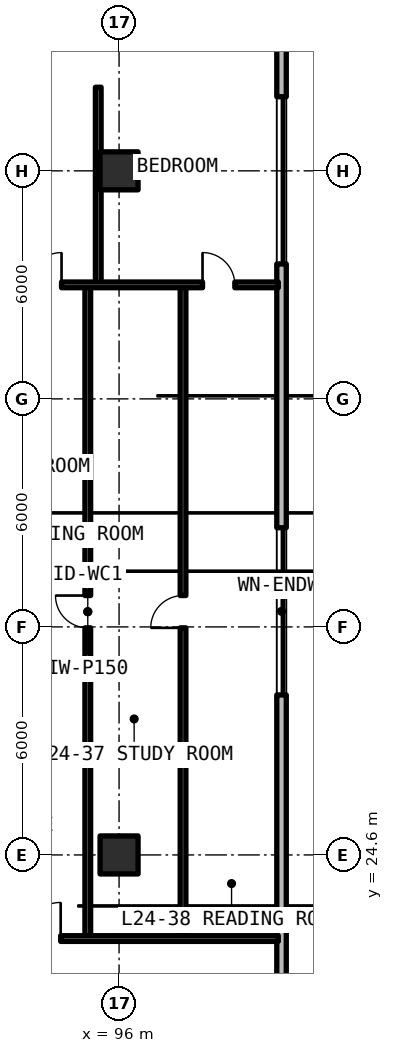
"""IFC4 building model, lengths in metres.
Left out: names, types, materials, properties, quantities, classifications, styles, units other than length and angle.
Written with IfcOpenShell. Run it as: python <this file> out.ifc"""

import sys

from ifc_helpers import new_model, si_unit, direction, frame, frame_2d, origin, origin_2d, place, context, subcontext, project, spatial, rectangle, extrude, element, fill, save


model = new_model("IFC4")
c1 = context("Model", 3, precision=1e-05, world=origin(), true_north=direction((0.0, 1.0)))
c2 = subcontext(c1, "Body", "Model", "MODEL_VIEW")
j1 = project(units=[si_unit("LENGTHUNIT", "METRE"), si_unit("PLANEANGLEUNIT", "RADIAN")], contexts=[c1])
p1 = place(None, origin())
s1 = spatial("IfcSite", under=j1, at=p1, CompositionType="ELEMENT")
p2 = place(p1, origin())
s2 = spatial("IfcBuilding", under=s1, at=p2, CompositionType="ELEMENT")
p3 = place(p2, frame((0.0, 0.0, 88.77)))
s3 = spatial("IfcBuildingStorey", under=s2, at=p3, CompositionType="ELEMENT", Elevation=88.77)
for number, where, z_axis, x_axis in (
    (1, (96.0, 24.6, 0.0), (0.0, 0.0, 1.0), (1.0, 0.0, 0.0)),
    (2, (96.0, 42.6, 0.0), (0.0, 0.0, 1.0), (1.0, 0.0, 0.0)),
):
    element("IfcColumn", number, at=place(p3, frame(where, z_axis=z_axis, x_axis=x_axis)), inside=s3, PredefinedType="COLUMN", context=c2, shape_type="SweptSolid", body=[
        extrude(rectangle(XDim=1.0, YDim=1.0, at=origin_2d()), origin(), (0.0, 0.0, 1.0), 3.3),
    ])
p4 = place(p3, frame((100.275, 13.852, 0.0), z_axis=(0.0, 0.0, 1.0), x_axis=(0.0, 1.0, 0.0)))
e3 = element("IfcWall", 3, at=p4, inside=s3, PredefinedType="SOLIDWALL", context=c2, shape_type="SweptSolid", body=[
    extrude(rectangle(XDim=39.496, YDim=0.25, at=frame_2d((19.748, 0.0))), origin(), (0.0, 0.0, 1.0), 3.08),
])
p5 = place(p4, frame((36.448, 0.0, 0.0)))
e4 = element("IfcOpeningElement", 4, at=p5, cuts=e3, PredefinedType="OPENING", context=c2, shape_type="SweptSolid", body=[
    extrude(rectangle(XDim=1.1, YDim=2.15, at=frame_2d((0.55, 1.075))), frame((0.0, 0.135, 0.0), z_axis=(0.0, -1.0, 0.0), x_axis=(1.0, 0.0, 0.0)), (0.0, 0.0, 1.0), 0.27),
])
p6 = place(p4, frame((14.958, 0.0, 0.78)))
e5 = element("IfcOpeningElement", 5, at=p6, cuts=e3, PredefinedType="OPENING", context=c2, shape_type="SweptSolid", body=[
    extrude(rectangle(XDim=4.4, YDim=1.66, at=frame_2d((2.2, 0.83))), frame((0.0, 0.135, 0.0), z_axis=(0.0, -1.0, 0.0), x_axis=(1.0, 0.0, 0.0)), (0.0, 0.0, 1.0), 0.27),
])
p7 = place(p4, frame((26.298, 0.0, 0.78)))
e6 = element("IfcOpeningElement", 6, at=p7, cuts=e3, PredefinedType="OPENING", context=c2, shape_type="SweptSolid", body=[
    extrude(rectangle(XDim=4.4, YDim=1.66, at=frame_2d((2.2, 0.83))), frame((0.0, 0.135, 0.0), z_axis=(0.0, -1.0, 0.0), x_axis=(1.0, 0.0, 0.0)), (0.0, 0.0, 1.0), 0.27),
])
p8 = place(p4, frame((2.454, 0.0, 0.78)))
e7 = element("IfcOpeningElement", 7, at=p8, cuts=e3, PredefinedType="OPENING", context=c2, shape_type="SweptSolid", body=[
    extrude(rectangle(XDim=1.4, YDim=1.65, at=frame_2d((0.7, 0.825))), frame((0.0, 0.135, 0.0), z_axis=(0.0, -1.0, 0.0), x_axis=(1.0, 0.0, 0.0)), (0.0, 0.0, 1.0), 0.27),
])
p9 = place(p3, frame((95.177, 22.4, 0.0), z_axis=(0.0, 0.0, 1.0), x_axis=(0.0, 1.0, 0.0)))
e8 = element("IfcWall", 8, at=p9, inside=s3, PredefinedType="PARTITIONING", context=c2, shape_type="SweptSolid", body=[
    extrude(rectangle(XDim=17.2, YDim=0.15, at=frame_2d((8.6, 0.0))), origin(), (0.0, 0.0, 1.0), 2.35),
])
p10 = place(p9, frame((8.175, 0.0, 0.0)))
e9 = element("IfcOpeningElement", 9, at=p10, cuts=e8, PredefinedType="OPENING", context=c2, shape_type="SweptSolid", body=[
    extrude(rectangle(XDim=0.85, YDim=2.1, at=frame_2d((0.425, 1.05))), frame((0.0, 0.085, 0.0), z_axis=(0.0, -1.0, 0.0), x_axis=(1.0, 0.0, 0.0)), (0.0, 0.0, 1.0), 0.17),
])
p11 = place(p3, frame((97.683, 22.4, 0.0), z_axis=(0.0, 0.0, 1.0), x_axis=(0.0, 1.0, 0.0)))
e10 = element("IfcWall", 10, at=p11, inside=s3, PredefinedType="PARTITIONING", context=c2, shape_type="SweptSolid", body=[
    extrude(rectangle(XDim=17.2, YDim=0.15, at=frame_2d((8.6, 0.0))), origin(), (0.0, 0.0, 1.0), 2.35),
])
p12 = place(p11, frame((8.175, 0.0, 0.0)))
e11 = element("IfcOpeningElement", 11, at=p12, cuts=e10, PredefinedType="OPENING", context=c2, shape_type="SweptSolid", body=[
    extrude(rectangle(XDim=0.85, YDim=2.1, at=frame_2d((0.425, 1.05))), frame((0.0, 0.085, 0.0), z_axis=(0.0, -1.0, 0.0), x_axis=(1.0, 0.0, 0.0)), (0.0, 0.0, 1.0), 0.17),
])
p13 = place(p3, frame((95.452, 39.6, 0.0), z_axis=(0.0, 0.0, 1.0), x_axis=(0.0, 1.0, 0.0)))
e12 = element("IfcWall", 12, at=p13, inside=s3, PredefinedType="PARTITIONING", context=c2, shape_type="SweptSolid", body=[
    extrude(rectangle(XDim=5.2, YDim=0.15, at=frame_2d((2.6, 0.0))), origin(), (0.0, 0.0, 1.0), 2.35),
])
p14 = place(p3, frame((90.32, 39.6, 0.0), z_axis=(0.0, 0.0, 1.0), x_axis=(1.0, 0.0, 0.0)))
e13 = element("IfcWall", 13, at=p14, inside=s3, PredefinedType="PARTITIONING", context=c2, shape_type="SweptSolid", body=[
    extrude(rectangle(XDim=9.87, YDim=0.15, at=frame_2d((4.935, 0.0))), origin(), (0.0, 0.0, 1.0), 2.35),
])
p15 = place(p14, frame((3.316, 0.0, 0.0)))
e14 = element("IfcOpeningElement", 14, at=p15, cuts=e13, PredefinedType="OPENING", context=c2, shape_type="SweptSolid", body=[
    extrude(rectangle(XDim=0.85, YDim=2.1, at=frame_2d((0.425, 1.05))), frame((0.0, 0.085, 0.0), z_axis=(0.0, -1.0, 0.0), x_axis=(1.0, 0.0, 0.0)), (0.0, 0.0, 1.0), 0.17),
])
p16 = place(p14, frame((7.876, 0.0, 0.0)))
e15 = element("IfcOpeningElement", 15, at=p16, cuts=e13, PredefinedType="OPENING", context=c2, shape_type="SweptSolid", body=[
    extrude(rectangle(XDim=0.85, YDim=2.1, at=frame_2d((0.425, 1.05))), frame((0.0, 0.085, 0.0), z_axis=(0.0, -1.0, 0.0), x_axis=(1.0, 0.0, 0.0)), (0.0, 0.0, 1.0), 0.17),
])
p17 = place(p3, frame((90.32, 22.4, 0.0), z_axis=(0.0, 0.0, 1.0), x_axis=(1.0, 0.0, 0.0)))
e16 = element("IfcWall", 16, at=p17, inside=s3, PredefinedType="SOLIDWALL", context=c2, shape_type="SweptSolid", body=[
    extrude(rectangle(XDim=9.87, YDim=0.15, at=frame_2d((4.935, 0.0))), origin(), (0.0, 0.0, 1.0), 2.35),
])
p18 = place(p17, frame((3.193, 0.0, 0.0)))
e17 = element("IfcOpeningElement", 17, at=p18, cuts=e16, PredefinedType="OPENING", context=c2, shape_type="SweptSolid", body=[
    extrude(rectangle(XDim=0.95, YDim=2.15, at=frame_2d((0.475, 1.075))), frame((0.0, 0.085, 0.0), z_axis=(0.0, -1.0, 0.0), x_axis=(1.0, 0.0, 0.0)), (0.0, 0.0, 1.0), 0.17),
])
p19 = place(p6, origin())
e18 = element("IfcWindow", 18, at=p19, inside=s3, PartitioningType="SINGLE_PANEL", PredefinedType="WINDOW", context=c2, shape_type="SweptSolid", body=[
    extrude(rectangle(XDim=4.4, YDim=1.66, at=frame_2d((2.2, 0.83))), frame((0.0, 0.03, 0.0), z_axis=(0.0, -1.0, 0.0), x_axis=(1.0, 0.0, 0.0)), (0.0, 0.0, 1.0), 0.06),
])
fill(e5, e18)
p20 = place(p7, origin())
e19 = element("IfcWindow", 19, at=p20, inside=s3, PartitioningType="SINGLE_PANEL", PredefinedType="WINDOW", context=c2, shape_type="SweptSolid", body=[
    extrude(rectangle(XDim=4.4, YDim=1.66, at=frame_2d((2.2, 0.83))), frame((0.0, 0.03, 0.0), z_axis=(0.0, -1.0, 0.0), x_axis=(1.0, 0.0, 0.0)), (0.0, 0.0, 1.0), 0.06),
])
fill(e6, e19)
p21 = place(p10, origin())
e20 = element("IfcDoor", 20, at=p21, inside=s3, OperationType="SINGLE_SWING_RIGHT", PredefinedType="DOOR", context=c2, shape_type="SweptSolid", body=[
    extrude(rectangle(XDim=0.85, YDim=2.1, at=frame_2d((0.425, 1.05))), frame((0.0, 0.025, 0.0), z_axis=(0.0, -1.0, 0.0), x_axis=(1.0, 0.0, 0.0)), (0.0, 0.0, 1.0), 0.05),
])
fill(e9, e20)
p22 = place(p12, origin())
e21 = element("IfcDoor", 21, at=p22, inside=s3, OperationType="SINGLE_SWING_LEFT", PredefinedType="DOOR", context=c2, shape_type="SweptSolid", body=[
    extrude(rectangle(XDim=0.85, YDim=2.1, at=frame_2d((0.425, 1.05))), frame((0.0, 0.025, 0.0), z_axis=(0.0, -1.0, 0.0), x_axis=(1.0, 0.0, 0.0)), (0.0, 0.0, 1.0), 0.05),
])
fill(e11, e21)
p23 = place(p15, origin())
e22 = element("IfcDoor", 22, at=p23, inside=s3, OperationType="SINGLE_SWING_RIGHT", PredefinedType="DOOR", context=c2, shape_type="SweptSolid", body=[
    extrude(rectangle(XDim=0.85, YDim=2.1, at=frame_2d((0.425, 1.05))), frame((0.0, 0.025, 0.0), z_axis=(0.0, -1.0, 0.0), x_axis=(1.0, 0.0, 0.0)), (0.0, 0.0, 1.0), 0.05),
])
fill(e14, e22)
p24 = place(p16, origin())
e23 = element("IfcDoor", 23, at=p24, inside=s3, OperationType="SINGLE_SWING_LEFT", PredefinedType="DOOR", context=c2, shape_type="SweptSolid", body=[
    extrude(rectangle(XDim=0.85, YDim=2.1, at=frame_2d((0.425, 1.05))), frame((0.0, 0.025, 0.0), z_axis=(0.0, -1.0, 0.0), x_axis=(1.0, 0.0, 0.0)), (0.0, 0.0, 1.0), 0.05),
])
fill(e15, e23)
p25 = place(p18, origin())
e24 = element("IfcDoor", 24, at=p25, inside=s3, OperationType="SINGLE_SWING_RIGHT", PredefinedType="DOOR", context=c2, shape_type="SweptSolid", body=[
    extrude(rectangle(XDim=0.95, YDim=2.15, at=frame_2d((0.475, 1.075))), frame((0.0, 0.025, 0.0), z_axis=(0.0, -1.0, 0.0), x_axis=(1.0, 0.0, 0.0)), (0.0, 0.0, 1.0), 0.05),
])
fill(e17, e24)
save(model, sys.argv[1])
